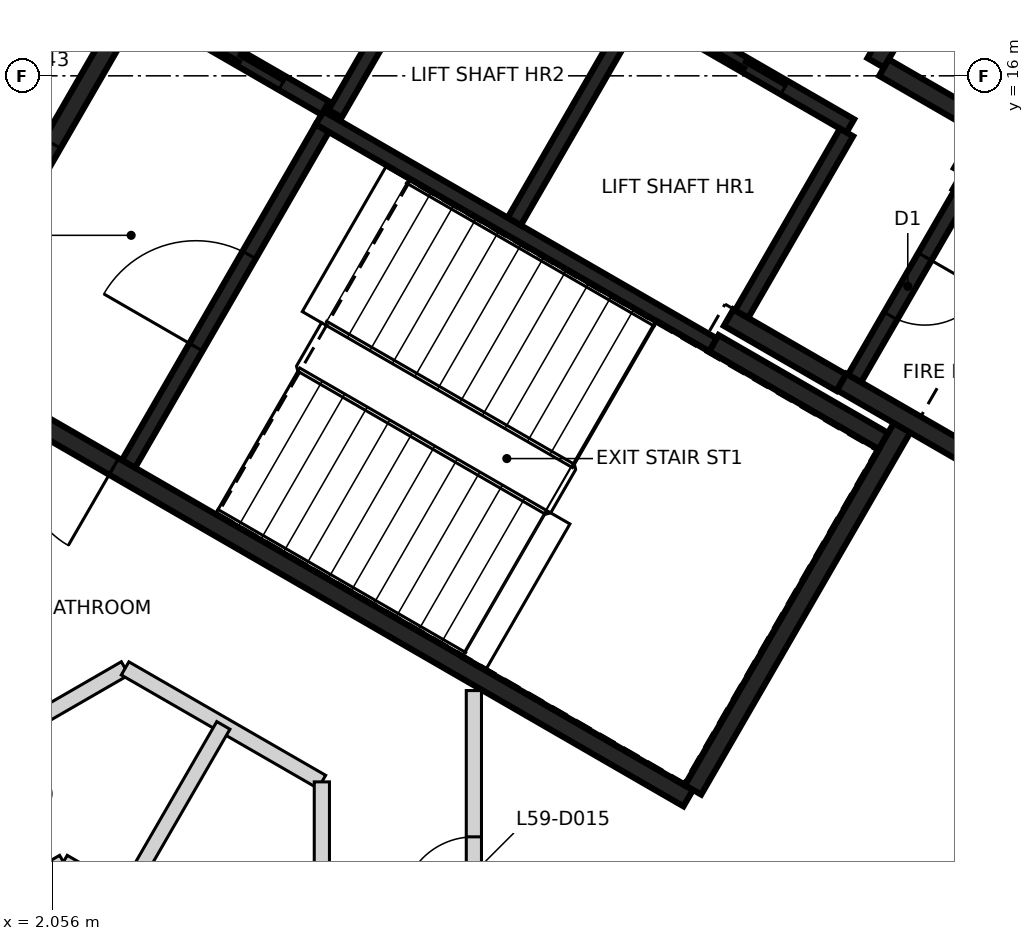
"""IFC4 building model, lengths in metres.
Left out: names, types, materials, properties, quantities, classifications, styles, units other than length and angle.
Written with IfcOpenShell. Run it as: python <this file> out.ifc"""

import sys

from ifc_helpers import new_model, si_unit, direction, frame, frame_2d, origin, place, context, subcontext, project, spatial, rectangle, extrude, element, fill, save


model = new_model("IFC4")
c1 = context("Model", 3, precision=1e-05, world=origin(), true_north=direction((0.0, 1.0)))
c2 = subcontext(c1, "Body", "Model", "MODEL_VIEW")
j1 = project(units=[si_unit("LENGTHUNIT", "METRE"), si_unit("PLANEANGLEUNIT", "RADIAN")], contexts=[c1])
p1 = place(None, origin())
s1 = spatial("IfcSite", under=j1, at=p1, CompositionType="ELEMENT")
p2 = place(p1, origin())
s2 = spatial("IfcBuilding", under=s1, at=p2, CompositionType="ELEMENT")
p3 = place(p2, frame((0.0, 0.0, 235.8)))
s3 = spatial("IfcBuildingStorey", under=s2, at=p3, CompositionType="ELEMENT", Elevation=235.8)
p4 = place(p3, frame((10.42, 6.498, 0.0), z_axis=(0.0, 0.0, 1.0), x_axis=(-0.866021906294, 0.500006057782, 0.0)))
e1 = element("IfcWall", 1, at=p4, inside=s3, PredefinedType="SHEAR", context=c2, shape_type="SweptSolid", body=[
    extrude(rectangle(XDim=11.55, YDim=0.25, at=frame_2d((5.775, 0.0))), origin(), (0.0, 0.0, 1.0), 3.25),
])
p5 = place(p4, frame((10.025, 0.0, 0.0)))
e2 = element("IfcOpeningElement", 2, at=p5, cuts=e1, PredefinedType="OPENING", context=c2, shape_type="SweptSolid", body=[
    extrude(rectangle(XDim=1.2, YDim=2.1, at=frame_2d((0.6, 1.05))), frame((0.0, 0.135, 0.0), z_axis=(0.0, -1.0, 0.0), x_axis=(1.0, 0.0, 0.0)), (0.0, 0.0, 1.0), 0.27),
])
p6 = place(p4, frame((8.725, 0.0, 0.0)))
e3 = element("IfcOpeningElement", 3, at=p6, cuts=e1, PredefinedType="OPENING", context=c2, shape_type="SweptSolid", body=[
    extrude(rectangle(XDim=1.2, YDim=2.1, at=frame_2d((0.6, 1.05))), frame((0.0, 0.135, 0.0), z_axis=(0.0, -1.0, 0.0), x_axis=(1.0, 0.0, 0.0)), (0.0, 0.0, 1.0), 0.27),
])
p7 = place(p3, frame((0.48, 12.381, 0.0), z_axis=(0.0, 0.0, 1.0), x_axis=(0.49999885962, 0.866026062182, 0.0)))
e4 = element("IfcWall", 4, at=p7, inside=s3, PredefinedType="SHEAR", context=c2, shape_type="SweptSolid", body=[
    extrude(rectangle(XDim=5.225, YDim=0.25, at=frame_2d((2.612, 0.0))), origin(), (0.0, 0.0, 1.0), 3.25),
])
p8 = place(p7, frame((1.95, 0.0, 0.0)))
e5 = element("IfcOpeningElement", 5, at=p8, cuts=e4, PredefinedType="OPENING", context=c2, shape_type="SweptSolid", body=[
    extrude(rectangle(XDim=1.2, YDim=2.1, at=frame_2d((0.6, 1.05))), frame((0.0, 0.135, 0.0), z_axis=(0.0, -1.0, 0.0), x_axis=(1.0, 0.0, 0.0)), (0.0, 0.0, 1.0), 0.27),
])
p9 = place(p3, frame((13.238, 11.378, 0.0), z_axis=(0.0, 0.0, 1.0), x_axis=(-0.500008851346, -0.866020293397, 0.0)))
e6 = element("IfcWall", 6, at=p9, inside=s3, PredefinedType="SHEAR", context=c2, shape_type="SweptSolid", body=[
    extrude(rectangle(XDim=5.51, YDim=0.25, at=frame_2d((2.755, 0.0))), origin(), (0.0, 0.0, 1.0), 3.25),
])
p10 = place(p3, frame((14.918, 10.54, 0.0), z_axis=(0.0, 0.0, 1.0), x_axis=(-0.866063538972, 0.499933942099, 0.0)))
e7 = element("IfcWall", 7, at=p10, inside=s3, PredefinedType="SHEAR", context=c2, shape_type="SweptSolid", body=[
    extrude(rectangle(XDim=2.865, YDim=0.25, at=frame_2d((1.432, 0.0))), origin(), (0.0, 0.0, 1.0), 3.25),
])
p11 = place(p3, frame((13.963, 14.614, 0.0), z_axis=(0.0, 0.0, 1.0), x_axis=(0.866042235819, -0.499970844928, 0.0)))
e8 = element("IfcWall", 8, at=p11, inside=s3, PredefinedType="SHEAR", context=c2, shape_type="SweptSolid", body=[
    extrude(rectangle(XDim=2.865, YDim=0.25, at=frame_2d((1.432, 0.0))), origin(), (0.0, 0.0, 1.0), 3.25),
])
p12 = place(p3, frame((10.757, 12.481, 0.0), z_axis=(0.0, 0.0, 1.0), x_axis=(0.866022940537, -0.500004266446, 0.0)))
e9 = element("IfcWall", 9, at=p12, inside=s3, PredefinedType="SHEAR", context=c2, shape_type="SweptSolid", body=[
    extrude(rectangle(XDim=2.575, YDim=0.25, at=frame_2d((1.287, 0.0))), origin(), (0.0, 0.0, 1.0), 3.25),
])
p13 = place(p3, frame((13.819, 17.785, 0.0), z_axis=(0.0, 0.0, 1.0), x_axis=(-0.500039802285, -0.866002422705, 0.0)))
e10 = element("IfcWall", 10, at=p13, inside=s3, PredefinedType="SHEAR", context=c2, shape_type="SweptSolid", body=[
    extrude(rectangle(XDim=1.865, YDim=0.25, at=frame_2d((0.932, 0.0))), origin(), (0.0, 0.0, 1.0), 3.25),
])
p14 = place(p3, frame((12.433, 11.964, 0.0), z_axis=(0.0, 0.0, 1.0), x_axis=(-0.866038183914, 0.499977863513, 0.0)))
e11 = element("IfcWall", 11, at=p14, inside=s3, PredefinedType="SHEAR", context=c2, shape_type="SweptSolid", body=[
    extrude(rectangle(XDim=1.71, YDim=0.25, at=frame_2d((0.855, 0.0))), origin(), (0.0, 0.0, 1.0), 3.25),
])
p15 = place(p3, frame((12.995, 16.108, 0.0), z_axis=(0.0, 0.0, 1.0), x_axis=(0.866044474677, -0.49996696679, 0.0)))
e12 = element("IfcWall", 12, at=p15, inside=s3, PredefinedType="SHEAR", context=c2, shape_type="SweptSolid", body=[
    extrude(rectangle(XDim=1.584, YDim=0.25, at=frame_2d((0.792, 0.0))), origin(), (0.0, 0.0, 1.0), 3.25),
])
p16 = place(p3, frame((14.305, 15.207, 0.0), z_axis=(0.0, 0.0, 1.0), x_axis=(-0.499848422343, -0.866112899501, 0.0)))
e13 = element("IfcWall", 13, at=p16, inside=s3, PredefinedType="SHEAR", context=c2, shape_type="SweptSolid", body=[
    extrude(rectangle(XDim=0.559, YDim=0.25, at=frame_2d((0.28, 0.0))), origin(), (0.0, 0.0, 1.0), 3.25),
])
p17 = place(p3, frame((12.552, 15.342, 0.0), z_axis=(0.0, 0.0, 1.0), x_axis=(-0.866030299012, 0.499991521122, 0.0)))
e14 = element("IfcWall", 14, at=p17, inside=s3, PredefinedType="SHEAR", context=c2, shape_type="SweptSolid", body=[
    extrude(rectangle(XDim=6.1, YDim=0.2, at=frame_2d((3.05, 0.0))), origin(), (0.0, 0.0, 1.0), 3.25),
])
p18 = place(p17, frame((1.0, 0.0, 0.0)))
e15 = element("IfcOpeningElement", 15, at=p18, cuts=e14, PredefinedType="OPENING", context=c2, shape_type="SweptSolid", body=[
    extrude(rectangle(XDim=1.2, YDim=2.1, at=frame_2d((0.6, 1.05))), frame((0.0, 0.11, 0.0), z_axis=(0.0, -1.0, 0.0), x_axis=(1.0, 0.0, 0.0)), (0.0, 0.0, 1.0), 0.22),
])
p19 = place(p17, frame((3.982, 0.0, 0.0)))
e16 = element("IfcOpeningElement", 16, at=p19, cuts=e14, PredefinedType="OPENING", context=c2, shape_type="SweptSolid", body=[
    extrude(rectangle(XDim=1.2, YDim=2.1, at=frame_2d((0.6, 1.05))), frame((0.0, 0.11, 0.0), z_axis=(0.0, -1.0, 0.0), x_axis=(1.0, 0.0, 0.0)), (0.0, 0.0, 1.0), 0.22),
])
p20 = place(p3, frame((10.743, 12.46, 0.0), z_axis=(0.0, 0.0, 1.0), x_axis=(-0.866018848283, 0.500011354289, 0.0)))
e17 = element("IfcWall", 17, at=p20, inside=s3, PredefinedType="SHEAR", context=c2, shape_type="SweptSolid", body=[
    extrude(rectangle(XDim=5.974, YDim=0.2, at=frame_2d((2.987, 0.0))), origin(), (0.0, 0.0, 1.0), 3.25),
])
p21 = place(p3, frame((3.057, 10.895, 0.0), z_axis=(0.0, 0.0, 1.0), x_axis=(0.500027839223, 0.866009330205, 0.0)))
e18 = element("IfcWall", 18, at=p21, inside=s3, PredefinedType="SHEAR", context=c2, shape_type="SweptSolid", body=[
    extrude(rectangle(XDim=5.098, YDim=0.2, at=frame_2d((2.549, 0.0))), origin(), (0.0, 0.0, 1.0), 3.25),
])
p22 = place(p21, frame((1.774, 0.0, 0.0)))
e19 = element("IfcOpeningElement", 19, at=p22, cuts=e18, PredefinedType="OPENING", context=c2, shape_type="SweptSolid", body=[
    extrude(rectangle(XDim=1.4, YDim=2.1, at=frame_2d((0.7, 1.05))), frame((0.0, 0.11, 0.0), z_axis=(0.0, -1.0, 0.0), x_axis=(1.0, 0.0, 0.0)), (0.0, 0.0, 1.0), 0.22),
])
p23 = place(p3, frame((8.132, 14.084, 0.0), z_axis=(0.0, 0.0, 1.0), x_axis=(0.500030834389, 0.86600760081, 0.0)))
e20 = element("IfcWall", 20, at=p23, inside=s3, PredefinedType="SHEAR", context=c2, shape_type="SweptSolid", body=[
    extrude(rectangle(XDim=3.198, YDim=0.2, at=frame_2d((1.599, 0.0))), origin(), (0.0, 0.0, 1.0), 3.25),
])
p24 = place(p3, frame((14.008, 14.442, 0.0), z_axis=(0.0, 0.0, 1.0), x_axis=(-0.499986818241, -0.866033014143, 0.0)))
e21 = element("IfcWall", 21, at=p24, inside=s3, PredefinedType="SHEAR", context=c2, shape_type="SweptSolid", body=[
    extrude(rectangle(XDim=2.798, YDim=0.2, at=frame_2d((1.399, 0.0))), origin(), (0.0, 0.0, 1.0), 3.25),
])
p25 = place(p24, frame((0.949, 0.0, 0.0)))
e22 = element("IfcOpeningElement", 22, at=p25, cuts=e21, PredefinedType="OPENING", context=c2, shape_type="SweptSolid", body=[
    extrude(rectangle(XDim=0.9, YDim=2.1, at=frame_2d((0.45, 1.05))), frame((0.0, 0.11, 0.0), z_axis=(0.0, -1.0, 0.0), x_axis=(1.0, 0.0, 0.0)), (0.0, 0.0, 1.0), 0.22),
])
p26 = place(p3, frame((12.502, 15.255, 0.0), z_axis=(0.0, 0.0, 1.0), x_axis=(-0.499965018551, -0.866045599391, 0.0)))
e23 = element("IfcWall", 23, at=p26, inside=s3, PredefinedType="SHEAR", context=c2, shape_type="SweptSolid", body=[
    extrude(rectangle(XDim=2.759, YDim=0.2, at=frame_2d((1.379, 0.0))), origin(), (0.0, 0.0, 1.0), 3.25),
])
p27 = place(p3, frame((7.324, 18.187, 0.0), z_axis=(0.0, 0.0, 1.0), x_axis=(-0.499967891604, -0.866043940782, 0.0)))
e24 = element("IfcWall", 24, at=p27, inside=s3, PredefinedType="SHEAR", context=c2, shape_type="SweptSolid", body=[
    extrude(rectangle(XDim=3.1, YDim=0.2, at=frame_2d((1.55, 0.0))), origin(), (0.0, 0.0, 1.0), 3.25),
])
p28 = place(p3, frame((5.646, 15.576, 0.0), z_axis=(0.0, 0.0, 1.0), x_axis=(-0.866018407898, 0.500012117035, 0.0)))
e25 = element("IfcWall", 25, at=p28, inside=s3, PredefinedType="SHEAR", context=c2, shape_type="SweptSolid", body=[
    extrude(rectangle(XDim=2.651, YDim=0.2, at=frame_2d((1.325, 0.0))), origin(), (0.0, 0.0, 1.0), 3.25),
])
p29 = place(p28, frame((0.652, 0.0, 0.0)))
e26 = element("IfcOpeningElement", 26, at=p29, cuts=e25, PredefinedType="OPENING", context=c2, shape_type="SweptSolid", body=[
    extrude(rectangle(XDim=1.3, YDim=2.1, at=frame_2d((0.65, 1.05))), frame((0.0, 0.11, 0.0), z_axis=(0.0, -1.0, 0.0), x_axis=(1.0, 0.0, 0.0)), (0.0, 0.0, 1.0), 0.22),
])
p30 = place(p3, frame((-8.612, 1.494, 0.0), z_axis=(0.0, 0.0, 1.0), x_axis=(0.8660441356, 0.49996755414, 0.0)))
e27 = element("IfcWall", 27, at=p30, inside=s3, PredefinedType="PARTITIONING", context=c2, shape_type="SweptSolid", body=[
    extrude(rectangle(XDim=13.422, YDim=0.2, at=frame_2d((6.711, 0.0))), origin(), (0.0, 0.0, 1.0), 3.25),
])
p31 = place(p30, frame((9.611, 0.0, 0.0)))
e28 = element("IfcOpeningElement", 28, at=p31, cuts=e27, PredefinedType="OPENING", context=c2, shape_type="SweptSolid", body=[
    extrude(rectangle(XDim=0.9, YDim=2.1, at=frame_2d((0.45, 1.05))), frame((0.0, 0.11, 0.0), z_axis=(0.0, -1.0, 0.0), x_axis=(1.0, 0.0, 0.0)), (0.0, 0.0, 1.0), 0.22),
])
p32 = place(p30, frame((2.911, 0.0, 0.0)))
e29 = element("IfcOpeningElement", 29, at=p32, cuts=e27, PredefinedType="OPENING", context=c2, shape_type="SweptSolid", body=[
    extrude(rectangle(XDim=0.9, YDim=2.1, at=frame_2d((0.45, 1.05))), frame((0.0, 0.11, 0.0), z_axis=(0.0, -1.0, 0.0), x_axis=(1.0, 0.0, 0.0)), (0.0, 0.0, 1.0), 0.22),
])
p33 = place(p3, frame((-1.084, 12.65, 0.0), z_axis=(0.0, 0.0, 1.0), x_axis=(0.492373019537, 0.87038428848, 0.0)))
e30 = element("IfcWall", 30, at=p33, inside=s3, PredefinedType="PARTITIONING", context=c2, shape_type="SweptSolid", body=[
    extrude(rectangle(XDim=8.738, YDim=0.2, at=frame_2d((4.369, 0.0))), origin(), (0.0, 0.0, 1.0), 3.25),
])
p34 = place(p33, frame((5.23, 0.0, 0.0)))
e31 = element("IfcOpeningElement", 31, at=p34, cuts=e30, PredefinedType="OPENING", context=c2, shape_type="SweptSolid", body=[
    extrude(rectangle(XDim=1.0, YDim=2.1, at=frame_2d((0.5, 1.05))), frame((0.0, 0.11, 0.0), z_axis=(0.0, -1.0, 0.0), x_axis=(1.0, 0.0, 0.0)), (0.0, 0.0, 1.0), 0.22),
])
p35 = place(p3, frame((3.011, 8.204, 0.0), z_axis=(0.0, 0.0, 1.0), x_axis=(0.86628077395, -0.499557424812, 0.0)))
e32 = element("IfcWall", 32, at=p35, inside=s3, PredefinedType="PARTITIONING", context=c2, shape_type="SweptSolid", body=[
    extrude(rectangle(XDim=2.989, YDim=0.2, at=frame_2d((1.494, 0.0))), origin(), (0.0, 0.0, 1.0), 3.25),
])
p36 = place(p3, frame((5.6, -6.711, 0.0), z_axis=(0.0, 0.0, 1.0), x_axis=(0.0, 1.0, 0.0)))
e33 = element("IfcWall", 33, at=p36, inside=s3, PredefinedType="PARTITIONING", context=c2, shape_type="SweptSolid", body=[
    extrude(rectangle(XDim=13.422, YDim=0.2, at=frame_2d((6.711, 0.0))), origin(), (0.0, 0.0, 1.0), 3.25),
])
p37 = place(p36, frame((2.912, 0.0, 0.0)))
e34 = element("IfcOpeningElement", 34, at=p37, cuts=e33, PredefinedType="OPENING", context=c2, shape_type="SweptSolid", body=[
    extrude(rectangle(XDim=0.9, YDim=2.1, at=frame_2d((0.45, 1.05))), frame((0.0, 0.11, 0.0), z_axis=(0.0, -1.0, 0.0), x_axis=(1.0, 0.0, 0.0)), (0.0, 0.0, 1.0), 0.22),
])
p38 = place(p36, frame((9.611, 0.0, 0.0)))
e35 = element("IfcOpeningElement", 35, at=p38, cuts=e33, PredefinedType="OPENING", context=c2, shape_type="SweptSolid", body=[
    extrude(rectangle(XDim=0.9, YDim=2.1, at=frame_2d((0.45, 1.05))), frame((0.0, 0.11, 0.0), z_axis=(0.0, -1.0, 0.0), x_axis=(1.0, 0.0, 0.0)), (0.0, 0.0, 1.0), 0.22),
])
p39 = place(p3, frame((7.6, -4.966, 0.0), z_axis=(0.0, 0.0, 1.0), x_axis=(0.0, 1.0, 0.0)))
e36 = element("IfcWall", 36, at=p39, inside=s3, PredefinedType="PARTITIONING", context=c2, shape_type="SweptSolid", body=[
    extrude(rectangle(XDim=12.878, YDim=0.2, at=frame_2d((6.439, 0.0))), origin(), (0.0, 0.0, 1.0), 3.25),
])
p40 = place(p39, frame((10.004, 0.0, 0.0)))
e37 = element("IfcOpeningElement", 37, at=p40, cuts=e36, PredefinedType="OPENING", context=c2, shape_type="SweptSolid", body=[
    extrude(rectangle(XDim=0.95, YDim=2.1, at=frame_2d((0.475, 1.05))), frame((0.0, 0.11, 0.0), z_axis=(0.0, -1.0, 0.0), x_axis=(1.0, 0.0, 0.0)), (0.0, 0.0, 1.0), 0.22),
])
p41 = place(p3, frame((-6.0, 0.924, 0.0), z_axis=(0.0, 0.0, 1.0), x_axis=(0.866012967051, 0.500021540435, 0.0)))
e38 = element("IfcWall", 38, at=p41, inside=s3, PredefinedType="PARTITIONING", context=c2, shape_type="SweptSolid", body=[
    extrude(rectangle(XDim=9.468, YDim=0.2, at=frame_2d((4.734, 0.0))), origin(), (0.0, 0.0, 1.0), 3.25),
])
p42 = place(p3, frame((2.2, 5.658, 0.0), z_axis=(0.0, 0.0, 1.0), x_axis=(0.865818011038, -0.500359042851, 0.0)))
e39 = element("IfcWall", 39, at=p42, inside=s3, PredefinedType="PARTITIONING", context=c2, shape_type="SweptSolid", body=[
    extrude(rectangle(XDim=1.848, YDim=0.2, at=frame_2d((0.924, 0.0))), origin(), (0.0, 0.0, 1.0), 3.25),
])
p43 = place(p3, frame((3.0, 5.196, 0.0), z_axis=(0.0, 0.0, 1.0), x_axis=(0.500076354988, 0.865981315724, 0.0)))
e40 = element("IfcWall", 40, at=p43, inside=s3, PredefinedType="PARTITIONING", context=c2, shape_type="SweptSolid", body=[
    extrude(rectangle(XDim=2.607, YDim=0.2, at=frame_2d((1.304, 0.0))), origin(), (0.0, 0.0, 1.0), 3.25),
])
p44 = place(p29, origin())
e41 = element("IfcDoor", 41, at=p44, inside=s3, OperationType="SLIDING_TO_LEFT", PredefinedType="DOOR", context=c2, shape_type="SweptSolid", body=[
    extrude(rectangle(XDim=1.3, YDim=2.1, at=frame_2d((0.65, 1.05))), frame((0.0, 0.025, 0.0), z_axis=(0.0, -1.0, 0.0), x_axis=(1.0, 0.0, 0.0)), (0.0, 0.0, 1.0), 0.05),
])
fill(e26, e41)
p45 = place(p18, origin())
e42 = element("IfcDoor", 42, at=p45, inside=s3, OperationType="DOUBLE_DOOR_SLIDING", PredefinedType="DOOR", context=c2, shape_type="SweptSolid", body=[
    extrude(rectangle(XDim=1.2, YDim=2.1, at=frame_2d((0.6, 1.05))), frame((0.0, 0.025, 0.0), z_axis=(0.0, -1.0, 0.0), x_axis=(1.0, 0.0, 0.0)), (0.0, 0.0, 1.0), 0.05),
])
fill(e15, e42)
p46 = place(p6, origin())
e43 = element("IfcDoor", 43, at=p46, inside=s3, OperationType="SINGLE_SWING_RIGHT", PredefinedType="DOOR", context=c2, shape_type="SweptSolid", body=[
    extrude(rectangle(XDim=1.2, YDim=2.1, at=frame_2d((0.6, 1.05))), frame((0.0, 0.025, 0.0), z_axis=(0.0, -1.0, 0.0), x_axis=(1.0, 0.0, 0.0)), (0.0, 0.0, 1.0), 0.05),
])
fill(e3, e43)
p47 = place(p22, origin())
e44 = element("IfcDoor", 44, at=p47, inside=s3, OperationType="SINGLE_SWING_LEFT", PredefinedType="DOOR", context=c2, shape_type="SweptSolid", body=[
    extrude(rectangle(XDim=1.4, YDim=2.1, at=frame_2d((0.7, 1.05))), frame((0.0, 0.025, 0.0), z_axis=(0.0, -1.0, 0.0), x_axis=(1.0, 0.0, 0.0)), (0.0, 0.0, 1.0), 0.05),
])
fill(e19, e44)
p48 = place(p25, origin())
e45 = element("IfcDoor", 45, at=p48, inside=s3, OperationType="SINGLE_SWING_RIGHT", PredefinedType="DOOR", context=c2, shape_type="SweptSolid", body=[
    extrude(rectangle(XDim=0.9, YDim=2.1, at=frame_2d((0.45, 1.05))), frame((0.0, 0.025, 0.0), z_axis=(0.0, -1.0, 0.0), x_axis=(1.0, 0.0, 0.0)), (0.0, 0.0, 1.0), 0.05),
])
fill(e22, e45)
p49 = place(p8, origin())
e46 = element("IfcDoor", 46, at=p49, inside=s3, OperationType="SINGLE_SWING_RIGHT", PredefinedType="DOOR", context=c2, shape_type="SweptSolid", body=[
    extrude(rectangle(XDim=1.2, YDim=2.1, at=frame_2d((0.6, 1.05))), frame((0.0, 0.025, 0.0), z_axis=(0.0, -1.0, 0.0), x_axis=(1.0, 0.0, 0.0)), (0.0, 0.0, 1.0), 0.05),
])
fill(e5, e46)
p50 = place(p40, frame((0.95, 0.0, 0.0), z_axis=(0.0, 0.0, 1.0), x_axis=(-1.0, 0.0, 0.0)))
e47 = element("IfcDoor", 47, at=p50, inside=s3, OperationType="SINGLE_SWING_LEFT", PredefinedType="DOOR", context=c2, shape_type="SweptSolid", body=[
    extrude(rectangle(XDim=0.95, YDim=2.1, at=frame_2d((0.475, 1.05))), frame((0.0, 0.025, 0.0), z_axis=(0.0, -1.0, 0.0), x_axis=(1.0, 0.0, 0.0)), (0.0, 0.0, 1.0), 0.05),
])
fill(e37, e47)
save(model, sys.argv[1])
